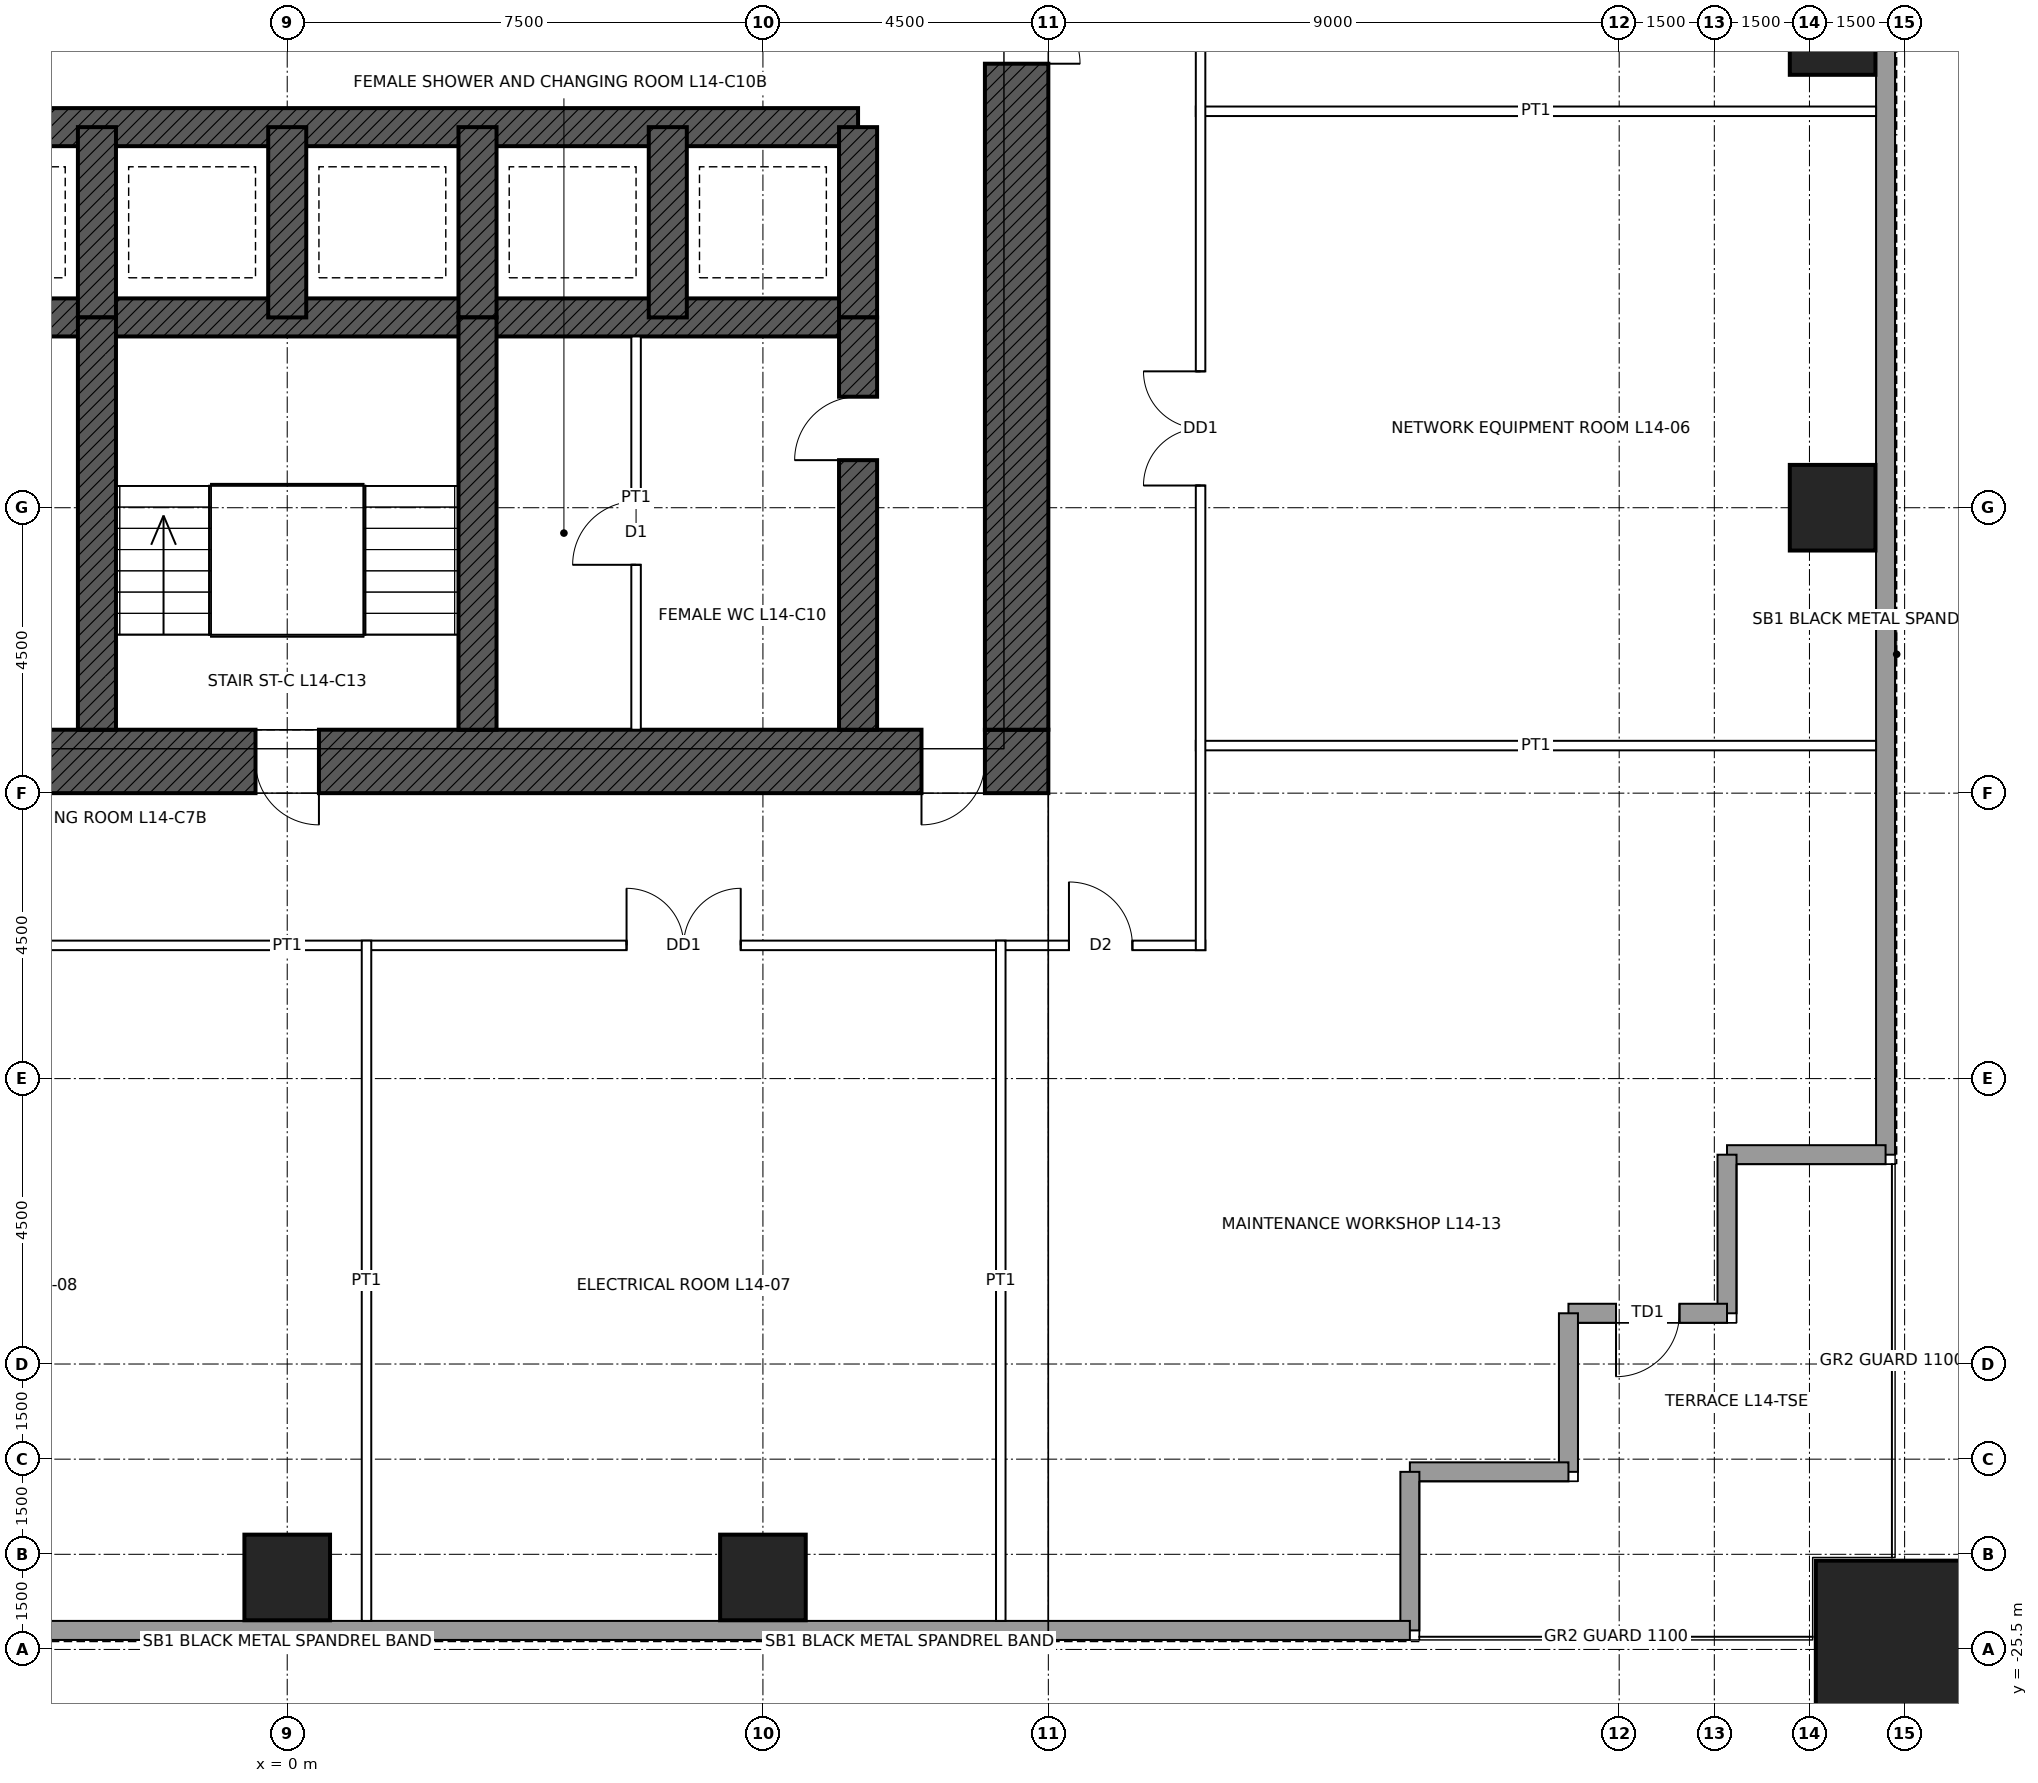
"""IFC4 building model, lengths in metres.
Left out: names, types, materials, properties, quantities, classifications, styles, units other than length and angle.
Written with IfcOpenShell. Run it as: python <this file> out.ifc"""

import sys

from ifc_helpers import new_model, si_unit, direction, frame, frame_2d, origin, origin_2d, place, context, subcontext, project, spatial, rectangle, hollow_rectangle, extrude, element, fill, save


model = new_model("IFC4")
c1 = context("Model", 3, precision=1e-05, world=origin(), true_north=direction((0.0, 1.0)))
c2 = subcontext(c1, "Body", "Model", "MODEL_VIEW")
j1 = project(units=[si_unit("LENGTHUNIT", "METRE"), si_unit("PLANEANGLEUNIT", "RADIAN")], contexts=[c1])
p1 = place(None, origin())
s1 = spatial("IfcSite", under=j1, at=p1, CompositionType="ELEMENT")
p2 = place(p1, origin())
s2 = spatial("IfcBuilding", under=s1, at=p2, CompositionType="ELEMENT")
p3 = place(p2, frame((0.0, 0.0, 73.4)))
s3 = spatial("IfcBuildingStorey", under=s2, at=p3, CompositionType="ELEMENT", Elevation=73.4)
p4 = place(p3, frame((25.5, -25.5, 0.0), z_axis=(0.0, 0.0, 1.0), x_axis=(1.0, 0.0, 0.0)))
e1 = element("IfcColumn", 1, at=p4, inside=s3, PredefinedType="COLUMN", context=c2, shape_type="SweptSolid", body=[
    extrude(hollow_rectangle(XDim=2.8, YDim=2.8, WallThickness=0.14, at=origin_2d()), origin(), (0.0, 0.0, 1.0), 5.0),
])
for number, where, z_axis, x_axis in (
    (2, (24.365, 0.0, 0.0), (0.0, 0.0, 1.0), (1.0, 0.0, 0.0)),
    (3, (24.365, -7.5, 0.0), (0.0, 0.0, 1.0), (1.0, 0.0, 0.0)),
    (4, (7.5, -24.365, 0.0), (0.0, 0.0, 1.0), (1.0, 0.0, 0.0)),
    (5, (0.0, -24.365, 0.0), (0.0, 0.0, 1.0), (1.0, 0.0, 0.0)),
):
    element("IfcColumn", number, at=place(p3, frame(where, z_axis=z_axis, x_axis=x_axis)), inside=s3, PredefinedType="COLUMN", context=c2, shape_type="SweptSolid", body=[
        extrude(hollow_rectangle(XDim=1.35, YDim=1.35, WallThickness=0.085, at=origin_2d()), origin(), (0.0, 0.0, 1.0), 5.0),
    ])
p5 = place(p3, frame((12.0, -11.5, 0.0), z_axis=(0.0, 0.0, 1.0), x_axis=(-1.0, 0.0, 0.0)))
e6 = element("IfcWall", 6, at=p5, inside=s3, PredefinedType="SHEAR", context=c2, shape_type="SweptSolid", body=[
    extrude(rectangle(XDim=24.0, YDim=1.0, at=frame_2d((12.0, 0.0))), origin(), (0.0, 0.0, 1.0), 5.0),
])
p6 = place(p5, frame((11.5, 0.0, 0.0)))
e7 = element("IfcOpeningElement", 7, at=p6, cuts=e6, PredefinedType="OPENING", context=c2, shape_type="SweptSolid", body=[
    extrude(rectangle(XDim=1.0, YDim=2.1, at=frame_2d((0.5, 1.05))), frame((0.0, 0.51, 0.0), z_axis=(0.0, -1.0, 0.0), x_axis=(1.0, 0.0, 0.0)), (0.0, 0.0, 1.0), 1.02),
])
p7 = place(p5, frame((1.0, 0.0, 0.0)))
e8 = element("IfcOpeningElement", 8, at=p7, cuts=e6, PredefinedType="OPENING", context=c2, shape_type="SweptSolid", body=[
    extrude(rectangle(XDim=1.0, YDim=2.4, at=frame_2d((0.5, 1.2))), frame((0.0, 0.51, 0.0), z_axis=(0.0, -1.0, 0.0), x_axis=(1.0, 0.0, 0.0)), (0.0, 0.0, 1.0), 1.02),
])
p8 = place(p3, frame((11.5, 11.0, 0.0), z_axis=(0.0, 0.0, 1.0), x_axis=(0.0, -1.0, 0.0)))
e9 = element("IfcWall", 9, at=p8, inside=s3, PredefinedType="SHEAR", context=c2, shape_type="SweptSolid", body=[
    extrude(rectangle(XDim=22.0, YDim=1.0, at=frame_2d((11.0, 0.0))), origin(), (0.0, 0.0, 1.0), 5.0),
])
p9 = place(p8, frame((10.5, 0.0, 0.0)))
e10 = element("IfcOpeningElement", 10, at=p9, cuts=e9, PredefinedType="OPENING", context=c2, shape_type="SweptSolid", body=[
    extrude(rectangle(XDim=1.0, YDim=2.4, at=frame_2d((0.5, 1.2))), frame((0.0, 0.51, 0.0), z_axis=(0.0, -1.0, 0.0), x_axis=(1.0, 0.0, 0.0)), (0.0, 0.0, 1.0), 1.02),
])
for number, where, z_axis, x_axis in (
    (11, (-9.0, -1.5, 0.0), (0.0, 0.0, 1.0), (1.0, 0.0, 0.0)),
    (12, (-9.0, -4.5, 0.0), (0.0, 0.0, 1.0), (1.0, 0.0, 0.0)),
):
    element("IfcWall", number, at=place(p3, frame(where, z_axis=z_axis, x_axis=x_axis)), inside=s3, PredefinedType="SHEAR", context=c2, shape_type="SweptSolid", body=[
        extrude(rectangle(XDim=18.0, YDim=0.6, at=frame_2d((9.0, 0.0))), origin(), (0.0, 0.0, 1.0), 5.0),
    ])
for number, where, z_axis, x_axis in (
    (13, (9.0, -4.5, 0.0), (0.0, 0.0, 1.0), (0.0, 1.0, 0.0)),
    (14, (-3.0, -4.5, 0.0), (0.0, 0.0, 1.0), (0.0, 1.0, 0.0)),
    (15, (0.0, -4.5, 0.0), (0.0, 0.0, 1.0), (0.0, 1.0, 0.0)),
    (16, (3.0, -4.5, 0.0), (0.0, 0.0, 1.0), (0.0, 1.0, 0.0)),
    (17, (6.0, -4.5, 0.0), (0.0, 0.0, 1.0), (0.0, 1.0, 0.0)),
):
    element("IfcWall", number, at=place(p3, frame(where, z_axis=z_axis, x_axis=x_axis)), inside=s3, PredefinedType="SHEAR", context=c2, shape_type="SweptSolid", body=[
        extrude(rectangle(XDim=3.0, YDim=0.6, at=frame_2d((1.5, 0.0))), origin(), (0.0, 0.0, 1.0), 5.0),
    ])
p10 = place(p3, frame((9.0, -11.0, 0.0), z_axis=(0.0, 0.0, 1.0), x_axis=(0.0, 1.0, 0.0)))
e18 = element("IfcWall", 18, at=p10, inside=s3, PredefinedType="SHEAR", context=c2, shape_type="SweptSolid", body=[
    extrude(rectangle(XDim=6.5, YDim=0.6, at=frame_2d((3.25, 0.0))), origin(), (0.0, 0.0, 1.0), 5.0),
])
p11 = place(p10, frame((4.25, 0.0, 0.0)))
e19 = element("IfcOpeningElement", 19, at=p11, cuts=e18, PredefinedType="OPENING", context=c2, shape_type="SweptSolid", body=[
    extrude(rectangle(XDim=1.0, YDim=2.1, at=frame_2d((0.5, 1.05))), frame((0.0, 0.31, 0.0), z_axis=(0.0, -1.0, 0.0), x_axis=(1.0, 0.0, 0.0)), (0.0, 0.0, 1.0), 0.62),
])
for number, where, z_axis, x_axis in (
    (20, (-3.0, -11.0, 0.0), (0.0, 0.0, 1.0), (0.0, 1.0, 0.0)),
    (21, (3.0, -11.0, 0.0), (0.0, 0.0, 1.0), (0.0, 1.0, 0.0)),
):
    element("IfcWall", number, at=place(p3, frame(where, z_axis=z_axis, x_axis=x_axis)), inside=s3, PredefinedType="SHEAR", context=c2, shape_type="SweptSolid", body=[
        extrude(rectangle(XDim=6.5, YDim=0.6, at=frame_2d((3.25, 0.0))), origin(), (0.0, 0.0, 1.0), 5.0),
    ])
p12 = place(p3, frame((25.2, 17.7, 0.0), z_axis=(0.0, 0.0, 1.0), x_axis=(0.0, -1.0, 0.0)))
e22 = element("IfcWall", 22, at=p12, inside=s3, PredefinedType="SOLIDWALL", context=c2, shape_type="SweptSolid", body=[
    extrude(rectangle(XDim=35.4, YDim=0.3, at=frame_2d((17.7, 0.0))), origin(), (0.0, 0.0, 1.0), 4.8),
])
for number, where, z_axis, x_axis in (
    (23, (25.2, -17.7, 0.0), (0.0, 0.0, 1.0), (-1.0, 0.0, 0.0)),
    (24, (22.7, -17.7, 0.0), (0.0, 0.0, 1.0), (0.0, -1.0, 0.0)),
):
    element("IfcWall", number, at=place(p3, frame(where, z_axis=z_axis, x_axis=x_axis)), inside=s3, PredefinedType="SOLIDWALL", context=c2, shape_type="SweptSolid", body=[
        extrude(rectangle(XDim=2.5, YDim=0.3, at=frame_2d((1.25, 0.0))), origin(), (0.0, 0.0, 1.0), 4.8),
    ])
p13 = place(p3, frame((22.7, -20.2, 0.0), z_axis=(0.0, 0.0, 1.0), x_axis=(-1.0, 0.0, 0.0)))
e25 = element("IfcWall", 25, at=p13, inside=s3, PredefinedType="SOLIDWALL", context=c2, shape_type="SweptSolid", body=[
    extrude(rectangle(XDim=2.5, YDim=0.3, at=frame_2d((1.25, 0.0))), origin(), (0.0, 0.0, 1.0), 4.8),
])
p14 = place(p13, frame((0.75, 0.0, 0.0)))
e26 = element("IfcOpeningElement", 26, at=p14, cuts=e25, PredefinedType="OPENING", context=c2, shape_type="SweptSolid", body=[
    extrude(rectangle(XDim=1.0, YDim=2.4, at=frame_2d((0.5, 1.2))), frame((0.0, 0.16, 0.0), z_axis=(0.0, -1.0, 0.0), x_axis=(1.0, 0.0, 0.0)), (0.0, 0.0, 1.0), 0.32),
])
for number, where, z_axis, x_axis in (
    (27, (20.2, -20.2, 0.0), (0.0, 0.0, 1.0), (0.0, -1.0, 0.0)),
    (28, (20.2, -22.7, 0.0), (0.0, 0.0, 1.0), (-1.0, 0.0, 0.0)),
    (29, (17.7, -22.7, 0.0), (0.0, 0.0, 1.0), (0.0, -1.0, 0.0)),
):
    element("IfcWall", number, at=place(p3, frame(where, z_axis=z_axis, x_axis=x_axis)), inside=s3, PredefinedType="SOLIDWALL", context=c2, shape_type="SweptSolid", body=[
        extrude(rectangle(XDim=2.5, YDim=0.3, at=frame_2d((1.25, 0.0))), origin(), (0.0, 0.0, 1.0), 4.8),
    ])
p15 = place(p3, frame((17.7, -25.2, 0.0), z_axis=(0.0, 0.0, 1.0), x_axis=(-1.0, 0.0, 0.0)))
e30 = element("IfcWall", 30, at=p15, inside=s3, PredefinedType="SOLIDWALL", context=c2, shape_type="SweptSolid", body=[
    extrude(rectangle(XDim=35.4, YDim=0.3, at=frame_2d((17.7, 0.0))), origin(), (0.0, 0.0, 1.0), 4.8),
])
p16 = place(p3, frame((-14.475, -14.4, 0.0), z_axis=(0.0, 0.0, 1.0), x_axis=(1.0, 0.0, 0.0)))
e31 = element("IfcWall", 31, at=p16, inside=s3, PredefinedType="PARTITIONING", context=c2, shape_type="SweptSolid", body=[
    extrude(rectangle(XDim=28.95, YDim=0.15, at=frame_2d((14.475, 0.0))), origin(), (0.0, 0.0, 1.0), 4.8),
])
p17 = place(p16, frame((19.825, 0.0, 0.0)))
e32 = element("IfcOpeningElement", 32, at=p17, cuts=e31, PredefinedType="OPENING", context=c2, shape_type="SweptSolid", body=[
    extrude(rectangle(XDim=1.8, YDim=2.4, at=frame_2d((0.9, 1.2))), frame((0.0, 0.085, 0.0), z_axis=(0.0, -1.0, 0.0), x_axis=(1.0, 0.0, 0.0)), (0.0, 0.0, 1.0), 0.17),
])
p18 = place(p16, frame((8.975, 0.0, 0.0)))
e33 = element("IfcOpeningElement", 33, at=p18, cuts=e31, PredefinedType="OPENING", context=c2, shape_type="SweptSolid", body=[
    extrude(rectangle(XDim=1.0, YDim=2.1, at=frame_2d((0.5, 1.05))), frame((0.0, 0.085, 0.0), z_axis=(0.0, -1.0, 0.0), x_axis=(1.0, 0.0, 0.0)), (0.0, 0.0, 1.0), 0.17),
])
p19 = place(p16, frame((26.8, 0.0, 0.0)))
e34 = element("IfcOpeningElement", 34, at=p19, cuts=e31, PredefinedType="OPENING", context=c2, shape_type="SweptSolid", body=[
    extrude(rectangle(XDim=1.0, YDim=2.1, at=frame_2d((0.5, 1.05))), frame((0.0, 0.085, 0.0), z_axis=(0.0, -1.0, 0.0), x_axis=(1.0, 0.0, 0.0)), (0.0, 0.0, 1.0), 0.17),
])
p20 = place(p16, frame((1.15, 0.0, 0.0)))
e35 = element("IfcOpeningElement", 35, at=p20, cuts=e31, PredefinedType="OPENING", context=c2, shape_type="SweptSolid", body=[
    extrude(rectangle(XDim=1.0, YDim=2.1, at=frame_2d((0.5, 1.05))), frame((0.0, 0.085, 0.0), z_axis=(0.0, -1.0, 0.0), x_axis=(1.0, 0.0, 0.0)), (0.0, 0.0, 1.0), 0.17),
])
p21 = place(p3, frame((14.325, -11.25, 0.0), z_axis=(0.0, 0.0, 1.0), x_axis=(1.0, 0.0, 0.0)))
e36 = element("IfcWall", 36, at=p21, inside=s3, PredefinedType="PARTITIONING", context=c2, shape_type="SweptSolid", body=[
    extrude(rectangle(XDim=10.725, YDim=0.15, at=frame_2d((5.363, 0.0))), origin(), (0.0, 0.0, 1.0), 3.853),
])
for number, where, z_axis, x_axis in (
    (37, (14.325, -1.25, 0.0), (0.0, 0.0, 1.0), (1.0, 0.0, 0.0)),
    (38, (1.25, -25.05, 0.0), (0.0, 0.0, 1.0), (0.0, 1.0, 0.0)),
):
    element("IfcWall", number, at=place(p3, frame(where, z_axis=z_axis, x_axis=x_axis)), inside=s3, PredefinedType="PARTITIONING", context=c2, shape_type="SweptSolid", body=[
        extrude(rectangle(XDim=10.725, YDim=0.15, at=frame_2d((5.363, 0.0))), origin(), (0.0, 0.0, 1.0), 4.8),
    ])
p22 = place(p3, frame((11.25, -25.05, 0.0), z_axis=(0.0, 0.0, 1.0), x_axis=(0.0, 1.0, 0.0)))
e39 = element("IfcWall", 39, at=p22, inside=s3, PredefinedType="PARTITIONING", context=c2, shape_type="SweptSolid", body=[
    extrude(rectangle(XDim=10.725, YDim=0.15, at=frame_2d((5.363, 0.0))), origin(), (0.0, 0.0, 1.0), 3.853),
])
p23 = place(p3, frame((14.4, -14.475, 0.0), z_axis=(0.0, 0.0, 1.0), x_axis=(0.0, 1.0, 0.0)))
e40 = element("IfcWall", 40, at=p23, inside=s3, PredefinedType="PARTITIONING", context=c2, shape_type="SweptSolid", body=[
    extrude(rectangle(XDim=28.95, YDim=0.15, at=frame_2d((14.475, 0.0))), origin(), (0.0, 0.0, 1.0), 4.8),
])
p24 = place(p23, frame((18.575, 0.0, 0.0)))
e41 = element("IfcOpeningElement", 41, at=p24, cuts=e40, PredefinedType="OPENING", context=c2, shape_type="SweptSolid", body=[
    extrude(rectangle(XDim=1.8, YDim=2.4, at=frame_2d((0.9, 1.2))), frame((0.0, 0.085, 0.0), z_axis=(0.0, -1.0, 0.0), x_axis=(1.0, 0.0, 0.0)), (0.0, 0.0, 1.0), 0.17),
])
p25 = place(p23, frame((7.325, 0.0, 0.0)))
e42 = element("IfcOpeningElement", 42, at=p25, cuts=e40, PredefinedType="OPENING", context=c2, shape_type="SweptSolid", body=[
    extrude(rectangle(XDim=1.8, YDim=2.4, at=frame_2d((0.9, 1.2))), frame((0.0, 0.085, 0.0), z_axis=(0.0, -1.0, 0.0), x_axis=(1.0, 0.0, 0.0)), (0.0, 0.0, 1.0), 0.17),
])
p26 = place(p3, frame((5.5, -11.0, 0.0), z_axis=(0.0, 0.0, 1.0), x_axis=(0.0, 1.0, 0.0)))
e43 = element("IfcWall", 43, at=p26, inside=s3, PredefinedType="PARTITIONING", context=c2, shape_type="SweptSolid", body=[
    extrude(rectangle(XDim=6.2, YDim=0.15, at=frame_2d((3.1, 0.0))), origin(), (0.0, 0.0, 1.0), 4.75),
])
p27 = place(p26, frame((2.6, 0.0, 0.0)))
e44 = element("IfcOpeningElement", 44, at=p27, cuts=e43, PredefinedType="OPENING", context=c2, shape_type="SweptSolid", body=[
    extrude(rectangle(XDim=1.0, YDim=2.1, at=frame_2d((0.5, 1.05))), frame((0.0, 0.085, 0.0), z_axis=(0.0, -1.0, 0.0), x_axis=(1.0, 0.0, 0.0)), (0.0, 0.0, 1.0), 0.17),
])
p28 = place(p14, origin())
e45 = element("IfcDoor", 45, at=p28, inside=s3, OperationType="SINGLE_SWING_RIGHT", PredefinedType="DOOR", context=c2, shape_type="SweptSolid", body=[
    extrude(rectangle(XDim=1.0, YDim=2.4, at=frame_2d((0.5, 1.2))), frame((0.0, 0.025, 0.0), z_axis=(0.0, -1.0, 0.0), x_axis=(1.0, 0.0, 0.0)), (0.0, 0.0, 1.0), 0.05),
])
fill(e26, e45)
p29 = place(p6, origin())
e46 = element("IfcDoor", 46, at=p29, inside=s3, OperationType="SINGLE_SWING_LEFT", PredefinedType="DOOR", context=c2, shape_type="SweptSolid", body=[
    extrude(rectangle(XDim=1.0, YDim=2.1, at=frame_2d((0.5, 1.05))), frame((0.0, 0.485, 0.0), z_axis=(0.0, -1.0, 0.0), x_axis=(1.0, 0.0, 0.0)), (0.0, 0.0, 1.0), 0.05),
])
fill(e7, e46)
p30 = place(p9, origin())
e47 = element("IfcDoor", 47, at=p30, inside=s3, OperationType="SINGLE_SWING_RIGHT", PredefinedType="DOOR", context=c2, shape_type="SweptSolid", body=[
    extrude(rectangle(XDim=1.0, YDim=2.4, at=frame_2d((0.5, 1.2))), frame((0.0, 0.485, 0.0), z_axis=(0.0, -1.0, 0.0), x_axis=(1.0, 0.0, 0.0)), (0.0, 0.0, 1.0), 0.05),
])
fill(e10, e47)
p31 = place(p7, origin())
e48 = element("IfcDoor", 48, at=p31, inside=s3, OperationType="SINGLE_SWING_RIGHT", PredefinedType="DOOR", context=c2, shape_type="SweptSolid", body=[
    extrude(rectangle(XDim=1.0, YDim=2.4, at=frame_2d((0.5, 1.2))), frame((0.0, 0.485, 0.0), z_axis=(0.0, -1.0, 0.0), x_axis=(1.0, 0.0, 0.0)), (0.0, 0.0, 1.0), 0.05),
])
fill(e8, e48)
p32 = place(p11, origin())
e49 = element("IfcDoor", 49, at=p32, inside=s3, OperationType="SINGLE_SWING_LEFT", PredefinedType="DOOR", context=c2, shape_type="SweptSolid", body=[
    extrude(rectangle(XDim=1.0, YDim=2.1, at=frame_2d((0.5, 1.05))), frame((0.0, 0.025, 0.0), z_axis=(0.0, -1.0, 0.0), x_axis=(1.0, 0.0, 0.0)), (0.0, 0.0, 1.0), 0.05),
])
fill(e19, e49)
p33 = place(p27, origin())
e50 = element("IfcDoor", 50, at=p33, inside=s3, OperationType="SINGLE_SWING_LEFT", PredefinedType="DOOR", context=c2, shape_type="SweptSolid", body=[
    extrude(rectangle(XDim=1.0, YDim=2.1, at=frame_2d((0.5, 1.05))), frame((0.0, 0.025, 0.0), z_axis=(0.0, -1.0, 0.0), x_axis=(1.0, 0.0, 0.0)), (0.0, 0.0, 1.0), 0.05),
])
fill(e44, e50)
p34 = place(p25, origin())
e51 = element("IfcDoor", 51, at=p34, inside=s3, OperationType="DOUBLE_DOOR_SINGLE_SWING", PredefinedType="DOOR", context=c2, shape_type="SweptSolid", body=[
    extrude(rectangle(XDim=1.8, YDim=2.4, at=frame_2d((0.9, 1.2))), frame((0.0, 0.025, 0.0), z_axis=(0.0, -1.0, 0.0), x_axis=(1.0, 0.0, 0.0)), (0.0, 0.0, 1.0), 0.05),
])
fill(e42, e51)
p35 = place(p17, origin())
e52 = element("IfcDoor", 52, at=p35, inside=s3, OperationType="DOUBLE_DOOR_SINGLE_SWING", PredefinedType="DOOR", context=c2, shape_type="SweptSolid", body=[
    extrude(rectangle(XDim=1.8, YDim=2.4, at=frame_2d((0.9, 1.2))), frame((0.0, 0.025, 0.0), z_axis=(0.0, -1.0, 0.0), x_axis=(1.0, 0.0, 0.0)), (0.0, 0.0, 1.0), 0.05),
])
fill(e32, e52)
p36 = place(p19, origin())
e53 = element("IfcDoor", 53, at=p36, inside=s3, OperationType="SINGLE_SWING_LEFT", PredefinedType="DOOR", context=c2, shape_type="SweptSolid", body=[
    extrude(rectangle(XDim=1.0, YDim=2.1, at=frame_2d((0.5, 1.05))), frame((0.0, 0.025, 0.0), z_axis=(0.0, -1.0, 0.0), x_axis=(1.0, 0.0, 0.0)), (0.0, 0.0, 1.0), 0.05),
])
fill(e34, e53)
save(model, sys.argv[1])
